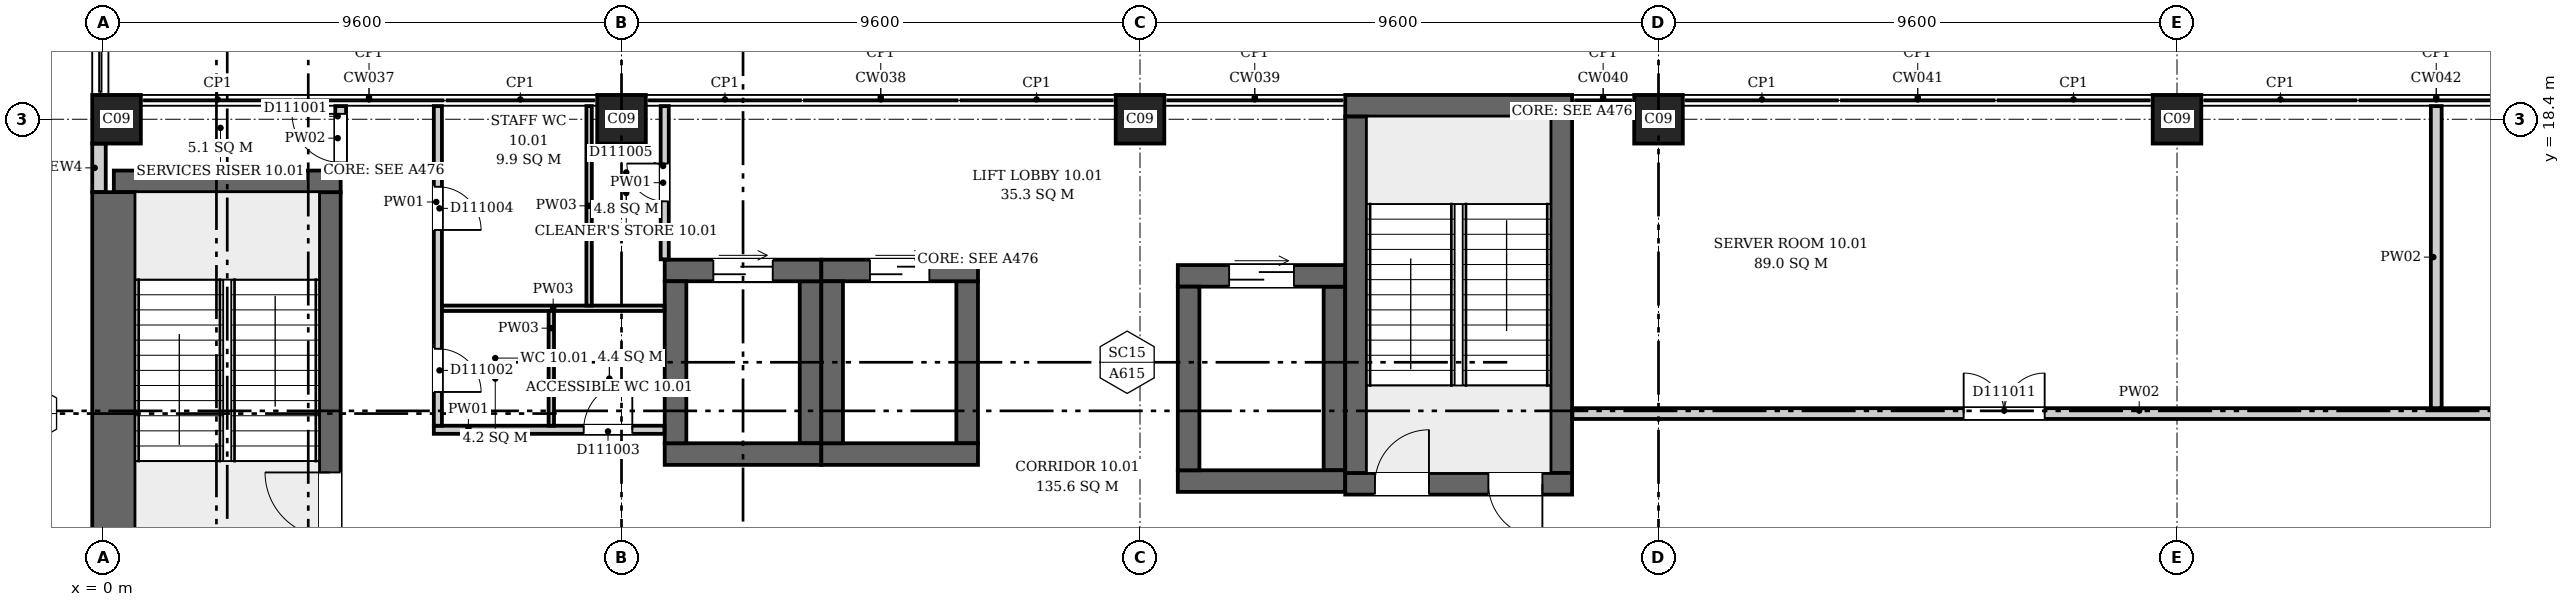
"""IFC4 building model, lengths in metres.
Left out: names, types, materials, properties, quantities, classifications, styles, units other than length and angle.
Written with IfcOpenShell. Run it as: python <this file> out.ifc"""

import sys

from ifc_helpers import new_model, si_unit, direction, frame, frame_2d, origin, origin_2d, place, context, subcontext, project, spatial, rectangle, extrude, element, fill, save


model = new_model("IFC4")
c1 = context("Model", 3, precision=1e-05, world=origin(), true_north=direction((0.0, 1.0)))
c2 = subcontext(c1, "Body", "Model", "MODEL_VIEW")
j1 = project(units=[si_unit("LENGTHUNIT", "METRE"), si_unit("PLANEANGLEUNIT", "RADIAN")], contexts=[c1])
p1 = place(None, origin())
s1 = spatial("IfcSite", under=j1, at=p1, CompositionType="ELEMENT")
p2 = place(p1, origin())
s2 = spatial("IfcBuilding", under=s1, at=p2, CompositionType="ELEMENT")
p3 = place(p2, frame((0.0, 0.0, 52.9)))
s3 = spatial("IfcBuildingStorey", under=s2, at=p3, CompositionType="ELEMENT", Elevation=52.9)
p4 = place(p3, frame((0.2, 17.25, 0.0), z_axis=(0.0, 0.0, 1.0), x_axis=(1.0, 0.0, 0.0)))
e1 = element("IfcWall", 1, at=p4, inside=s3, PredefinedType="SHEAR", context=c2, shape_type="SweptSolid", body=[
    extrude(rectangle(XDim=4.2, YDim=0.4, at=frame_2d((2.1, 0.0))), origin(), (0.0, 0.0, 1.0), 4.2),
])
p5 = place(p3, frame((0.2, 10.45, 0.0), z_axis=(0.0, 0.0, 1.0), x_axis=(0.0, 1.0, 0.0)))
e2 = element("IfcWall", 2, at=p5, inside=s3, PredefinedType="SHEAR", context=c2, shape_type="SweptSolid", body=[
    extrude(rectangle(XDim=6.6, YDim=0.8, at=frame_2d((3.3, 0.0))), origin(), (0.0, 0.0, 1.0), 4.2),
])
p6 = place(p3, frame((4.2, 10.45, 0.0), z_axis=(0.0, 0.0, 1.0), x_axis=(0.0, 1.0, 0.0)))
e3 = element("IfcWall", 3, at=p6, inside=s3, PredefinedType="SHEAR", context=c2, shape_type="SweptSolid", body=[
    extrude(rectangle(XDim=6.6, YDim=0.4, at=frame_2d((3.3, 0.0))), origin(), (0.0, 0.0, 1.0), 4.2),
])
p7 = place(p6, frame((0.21, 0.0, 0.0)))
e4 = element("IfcOpeningElement", 4, at=p7, cuts=e3, PredefinedType="OPENING", context=c2, shape_type="SweptSolid", body=[
    extrude(rectangle(XDim=1.2, YDim=2.1, at=frame_2d((0.6, 1.05))), frame((0.0, 0.21, 0.0), z_axis=(0.0, -1.0, 0.0), x_axis=(1.0, 0.0, 0.0)), (0.0, 0.0, 1.0), 0.42),
])
p8 = place(p3, frame((23.0, 11.65, 0.0), z_axis=(0.0, 0.0, 1.0), x_axis=(1.0, 0.0, 0.0)))
e5 = element("IfcWall", 5, at=p8, inside=s3, PredefinedType="SHEAR", context=c2, shape_type="SweptSolid", body=[
    extrude(rectangle(XDim=4.2, YDim=0.4, at=frame_2d((2.1, 0.0))), origin(), (0.0, 0.0, 1.0), 4.2),
])
p9 = place(p8, frame((0.55, 0.0, 0.0)))
e6 = element("IfcOpeningElement", 6, at=p9, cuts=e5, PredefinedType="OPENING", context=c2, shape_type="SweptSolid", body=[
    extrude(rectangle(XDim=1.0, YDim=2.1, at=frame_2d((0.5, 1.05))), frame((0.0, 0.21, 0.0), z_axis=(0.0, -1.0, 0.0), x_axis=(1.0, 0.0, 0.0)), (0.0, 0.0, 1.0), 0.42),
])
p10 = place(p8, frame((2.65, 0.0, 0.0)))
e7 = element("IfcOpeningElement", 7, at=p10, cuts=e5, PredefinedType="OPENING", context=c2, shape_type="SweptSolid", body=[
    extrude(rectangle(XDim=1.0, YDim=2.1, at=frame_2d((0.5, 1.05))), frame((0.0, 0.21, 0.0), z_axis=(0.0, -1.0, 0.0), x_axis=(1.0, 0.0, 0.0)), (0.0, 0.0, 1.0), 0.42),
])
p11 = place(p3, frame((23.0, 18.65, 0.0), z_axis=(0.0, 0.0, 1.0), x_axis=(1.0, 0.0, 0.0)))
e8 = element("IfcWall", 8, at=p11, inside=s3, PredefinedType="SHEAR", context=c2, shape_type="SweptSolid", body=[
    extrude(rectangle(XDim=4.2, YDim=0.4, at=frame_2d((2.1, 0.0))), origin(), (0.0, 0.0, 1.0), 4.2),
])
for number, where, z_axis, x_axis in (
    (9, (23.2, 11.85, 0.0), (0.0, 0.0, 1.0), (0.0, 1.0, 0.0)),
    (10, (27.0, 11.85, 0.0), (0.0, 0.0, 1.0), (0.0, 1.0, 0.0)),
):
    element("IfcWall", number, at=place(p3, frame(where, z_axis=z_axis, x_axis=x_axis)), inside=s3, PredefinedType="SHEAR", context=c2, shape_type="SweptSolid", body=[
        extrude(rectangle(XDim=6.6, YDim=0.4, at=frame_2d((3.3, 0.0))), origin(), (0.0, 0.0, 1.0), 4.2),
    ])
p12 = place(p3, frame((10.4, 12.2, 0.0), z_axis=(0.0, 0.0, 1.0), x_axis=(1.0, 0.0, 0.0)))
e11 = element("IfcWall", 11, at=p12, inside=s3, PredefinedType="SHEAR", context=c2, shape_type="SweptSolid", body=[
    extrude(rectangle(XDim=2.9, YDim=0.4, at=frame_2d((1.45, 0.0))), origin(), (0.0, 0.0, 1.0), 4.2),
])
p13 = place(p3, frame((10.4, 15.6, 0.0), z_axis=(0.0, 0.0, 1.0), x_axis=(1.0, 0.0, 0.0)))
e12 = element("IfcWall", 12, at=p13, inside=s3, PredefinedType="SHEAR", context=c2, shape_type="SweptSolid", body=[
    extrude(rectangle(XDim=2.9, YDim=0.4, at=frame_2d((1.45, 0.0))), origin(), (0.0, 0.0, 1.0), 4.2),
])
p14 = place(p13, frame((0.9, 0.0, 0.0)))
e13 = element("IfcOpeningElement", 13, at=p14, cuts=e12, PredefinedType="OPENING", context=c2, shape_type="SweptSolid", body=[
    extrude(rectangle(XDim=1.1, YDim=2.1, at=frame_2d((0.55, 1.05))), frame((0.0, 0.21, 0.0), z_axis=(0.0, -1.0, 0.0), x_axis=(1.0, 0.0, 0.0)), (0.0, 0.0, 1.0), 0.42),
])
for number, where, z_axis, x_axis in (
    (14, (10.6, 12.4, 0.0), (0.0, 0.0, 1.0), (0.0, 1.0, 0.0)),
    (15, (13.1, 12.4, 0.0), (0.0, 0.0, 1.0), (0.0, 1.0, 0.0)),
):
    element("IfcWall", number, at=place(p3, frame(where, z_axis=z_axis, x_axis=x_axis)), inside=s3, PredefinedType="SHEAR", context=c2, shape_type="SweptSolid", body=[
        extrude(rectangle(XDim=3.0, YDim=0.4, at=frame_2d((1.5, 0.0))), origin(), (0.0, 0.0, 1.0), 4.2),
    ])
p15 = place(p3, frame((13.3, 12.2, 0.0), z_axis=(0.0, 0.0, 1.0), x_axis=(1.0, 0.0, 0.0)))
e16 = element("IfcWall", 16, at=p15, inside=s3, PredefinedType="SHEAR", context=c2, shape_type="SweptSolid", body=[
    extrude(rectangle(XDim=2.9, YDim=0.4, at=frame_2d((1.45, 0.0))), origin(), (0.0, 0.0, 1.0), 4.2),
])
p16 = place(p3, frame((13.3, 15.6, 0.0), z_axis=(0.0, 0.0, 1.0), x_axis=(1.0, 0.0, 0.0)))
e17 = element("IfcWall", 17, at=p16, inside=s3, PredefinedType="SHEAR", context=c2, shape_type="SweptSolid", body=[
    extrude(rectangle(XDim=2.9, YDim=0.4, at=frame_2d((1.45, 0.0))), origin(), (0.0, 0.0, 1.0), 4.2),
])
p17 = place(p16, frame((0.9, 0.0, 0.0)))
e18 = element("IfcOpeningElement", 18, at=p17, cuts=e17, PredefinedType="OPENING", context=c2, shape_type="SweptSolid", body=[
    extrude(rectangle(XDim=1.1, YDim=2.1, at=frame_2d((0.55, 1.05))), frame((0.0, 0.21, 0.0), z_axis=(0.0, -1.0, 0.0), x_axis=(1.0, 0.0, 0.0)), (0.0, 0.0, 1.0), 0.42),
])
for number, where, z_axis, x_axis in (
    (19, (13.5, 12.4, 0.0), (0.0, 0.0, 1.0), (0.0, 1.0, 0.0)),
    (20, (16.0, 12.4, 0.0), (0.0, 0.0, 1.0), (0.0, 1.0, 0.0)),
):
    element("IfcWall", number, at=place(p3, frame(where, z_axis=z_axis, x_axis=x_axis)), inside=s3, PredefinedType="SHEAR", context=c2, shape_type="SweptSolid", body=[
        extrude(rectangle(XDim=3.0, YDim=0.4, at=frame_2d((1.5, 0.0))), origin(), (0.0, 0.0, 1.0), 4.2),
    ])
p18 = place(p3, frame((19.9, 11.7, 0.0), z_axis=(0.0, 0.0, 1.0), x_axis=(1.0, 0.0, 0.0)))
e21 = element("IfcWall", 21, at=p18, inside=s3, PredefinedType="SHEAR", context=c2, shape_type="SweptSolid", body=[
    extrude(rectangle(XDim=3.1, YDim=0.4, at=frame_2d((1.55, 0.0))), origin(), (0.0, 0.0, 1.0), 4.2),
])
p19 = place(p3, frame((19.9, 15.5, 0.0), z_axis=(0.0, 0.0, 1.0), x_axis=(1.0, 0.0, 0.0)))
e22 = element("IfcWall", 22, at=p19, inside=s3, PredefinedType="SHEAR", context=c2, shape_type="SweptSolid", body=[
    extrude(rectangle(XDim=3.1, YDim=0.4, at=frame_2d((1.55, 0.0))), origin(), (0.0, 0.0, 1.0), 4.2),
])
p20 = place(p19, frame((0.95, 0.0, 0.0)))
e23 = element("IfcOpeningElement", 23, at=p20, cuts=e22, PredefinedType="OPENING", context=c2, shape_type="SweptSolid", body=[
    extrude(rectangle(XDim=1.2, YDim=2.1, at=frame_2d((0.6, 1.05))), frame((0.0, 0.21, 0.0), z_axis=(0.0, -1.0, 0.0), x_axis=(1.0, 0.0, 0.0)), (0.0, 0.0, 1.0), 0.42),
])
for number, where, z_axis, x_axis in (
    (24, (20.1, 11.9, 0.0), (0.0, 0.0, 1.0), (0.0, 1.0, 0.0)),
    (25, (22.8, 11.9, 0.0), (0.0, 0.0, 1.0), (0.0, 1.0, 0.0)),
):
    element("IfcWall", number, at=place(p3, frame(where, z_axis=z_axis, x_axis=x_axis)), inside=s3, PredefinedType="SHEAR", context=c2, shape_type="SweptSolid", body=[
        extrude(rectangle(XDim=3.4, YDim=0.4, at=frame_2d((1.7, 0.0))), origin(), (0.0, 0.0, 1.0), 4.2),
    ])
for number, where, z_axis, x_axis in (
    (26, (0.25, 18.4, 0.0), (0.0, 0.0, 1.0), (1.0, 0.0, 0.0)),
    (27, (9.6, 18.4, 0.0), (0.0, 0.0, 1.0), (1.0, 0.0, 0.0)),
    (28, (19.2, 18.4, 0.0), (0.0, 0.0, 1.0), (1.0, 0.0, 0.0)),
    (29, (28.8, 18.4, 0.0), (0.0, 0.0, 1.0), (1.0, 0.0, 0.0)),
    (30, (38.4, 18.4, 0.0), (0.0, 0.0, 1.0), (1.0, 0.0, 0.0)),
):
    element("IfcColumn", number, at=place(p3, frame(where, z_axis=z_axis, x_axis=x_axis)), inside=s3, PredefinedType="COLUMN", context=c2, shape_type="SweptSolid", body=[
        extrude(rectangle(XDim=0.9, YDim=0.9, at=origin_2d()), origin(), (0.0, 0.0, 1.0), 4.2),
    ])
p21 = place(p3, frame((-0.074, 17.95, 0.0), z_axis=(0.0, 0.0, 1.0), x_axis=(0.0, -1.0, 0.0)))
e31 = element("IfcWall", 31, at=p21, inside=s3, PredefinedType="ELEMENTEDWALL", context=c2, shape_type="SweptSolid", body=[
    extrude(rectangle(XDim=0.9, YDim=0.25, at=frame_2d((0.45, 0.0))), origin(), (0.0, 0.0, 1.0), 3.9),
])
p22 = place(p3, frame((4.4, 17.456, 0.0), z_axis=(0.0, 0.0, 1.0), x_axis=(0.0, 1.0, 0.0)))
e32 = element("IfcWall", 32, at=p22, inside=s3, PredefinedType="PARTITIONING", context=c2, shape_type="SweptSolid", body=[
    extrude(rectangle(XDim=1.188, YDim=0.2, at=frame_2d((0.594, 0.0))), origin(), (0.0, 0.0, 1.0), 3.9),
])
p23 = place(p22, frame((0.144, 0.0, 0.0)))
e33 = element("IfcOpeningElement", 33, at=p23, cuts=e32, PredefinedType="OPENING", context=c2, shape_type="SweptSolid", body=[
    extrude(rectangle(XDim=0.9, YDim=2.1, at=frame_2d((0.45, 1.05))), frame((0.0, 0.11, 0.0), z_axis=(0.0, -1.0, 0.0), x_axis=(1.0, 0.0, 0.0)), (0.0, 0.0, 1.0), 0.22),
])
p24 = place(p3, frame((6.125, 12.65, 0.0), z_axis=(0.0, 0.0, 1.0), x_axis=(1.0, 0.0, 0.0)))
e34 = element("IfcWall", 34, at=p24, inside=s3, PredefinedType="PARTITIONING", context=c2, shape_type="SweptSolid", body=[
    extrude(rectangle(XDim=4.269, YDim=0.15, at=frame_2d((2.135, 0.0))), origin(), (0.0, 0.0, 1.0), 3.9),
])
p25 = place(p24, frame((2.775, 0.0, 0.0)))
e35 = element("IfcOpeningElement", 35, at=p25, cuts=e34, PredefinedType="OPENING", context=c2, shape_type="SweptSolid", body=[
    extrude(rectangle(XDim=0.9, YDim=2.1, at=frame_2d((0.45, 1.05))), frame((0.0, 0.085, 0.0), z_axis=(0.0, -1.0, 0.0), x_axis=(1.0, 0.0, 0.0)), (0.0, 0.0, 1.0), 0.17),
])
p26 = place(p3, frame((6.2, 12.725, 0.0), z_axis=(0.0, 0.0, 1.0), x_axis=(0.0, 1.0, 0.0)))
e36 = element("IfcWall", 36, at=p26, inside=s3, PredefinedType="PARTITIONING", context=c2, shape_type="SweptSolid", body=[
    extrude(rectangle(XDim=5.919, YDim=0.15, at=frame_2d((2.959, 0.0))), origin(), (0.0, 0.0, 1.0), 3.9),
])
p27 = place(p26, frame((0.625, 0.0, 0.0)))
e37 = element("IfcOpeningElement", 37, at=p27, cuts=e36, PredefinedType="OPENING", context=c2, shape_type="SweptSolid", body=[
    extrude(rectangle(XDim=0.8, YDim=2.1, at=frame_2d((0.4, 1.05))), frame((0.0, 0.085, 0.0), z_axis=(0.0, -1.0, 0.0), x_axis=(1.0, 0.0, 0.0)), (0.0, 0.0, 1.0), 0.17),
])
p28 = place(p26, frame((3.625, 0.0, 0.0)))
e38 = element("IfcOpeningElement", 38, at=p28, cuts=e36, PredefinedType="OPENING", context=c2, shape_type="SweptSolid", body=[
    extrude(rectangle(XDim=0.8, YDim=2.1, at=frame_2d((0.4, 1.05))), frame((0.0, 0.085, 0.0), z_axis=(0.0, -1.0, 0.0), x_axis=(1.0, 0.0, 0.0)), (0.0, 0.0, 1.0), 0.17),
])
p29 = place(p3, frame((6.275, 14.9, 0.0), z_axis=(0.0, 0.0, 1.0), x_axis=(1.0, 0.0, 0.0)))
e39 = element("IfcWall", 39, at=p29, inside=s3, PredefinedType="PARTITIONING", context=c2, shape_type="SweptSolid", body=[
    extrude(rectangle(XDim=4.119, YDim=0.1, at=frame_2d((2.06, 0.0))), origin(), (0.0, 0.0, 1.0), 3.9),
])
p30 = place(p3, frame((8.3, 12.725, 0.0), z_axis=(0.0, 0.0, 1.0), x_axis=(0.0, 1.0, 0.0)))
e40 = element("IfcWall", 40, at=p30, inside=s3, PredefinedType="PARTITIONING", context=c2, shape_type="SweptSolid", body=[
    extrude(rectangle(XDim=2.125, YDim=0.1, at=frame_2d((1.062, 0.0))), origin(), (0.0, 0.0, 1.0), 3.9),
])
p31 = place(p3, frame((9.0, 14.95, 0.0), z_axis=(0.0, 0.0, 1.0), x_axis=(0.0, 1.0, 0.0)))
e41 = element("IfcWall", 41, at=p31, inside=s3, PredefinedType="PARTITIONING", context=c2, shape_type="SweptSolid", body=[
    extrude(rectangle(XDim=3.694, YDim=0.1, at=frame_2d((1.847, 0.0))), origin(), (0.0, 0.0, 1.0), 3.9),
])
p32 = place(p3, frame((10.4, 15.806, 0.0), z_axis=(0.0, 0.0, 1.0), x_axis=(0.0, 1.0, 0.0)))
e42 = element("IfcWall", 42, at=p32, inside=s3, PredefinedType="PARTITIONING", context=c2, shape_type="SweptSolid", body=[
    extrude(rectangle(XDim=2.838, YDim=0.15, at=frame_2d((1.419, 0.0))), origin(), (0.0, 0.0, 1.0), 3.9),
])
p33 = place(p32, frame((1.074, 0.0, 0.0)))
e43 = element("IfcOpeningElement", 43, at=p33, cuts=e42, PredefinedType="OPENING", context=c2, shape_type="SweptSolid", body=[
    extrude(rectangle(XDim=0.7, YDim=2.1, at=frame_2d((0.35, 1.05))), frame((0.0, 0.085, 0.0), z_axis=(0.0, -1.0, 0.0), x_axis=(1.0, 0.0, 0.0)), (0.0, 0.0, 1.0), 0.17),
])
p34 = place(p3, frame((27.206, 12.95, 0.0), z_axis=(0.0, 0.0, 1.0), x_axis=(1.0, 0.0, 0.0)))
e44 = element("IfcWall", 44, at=p34, inside=s3, PredefinedType="PARTITIONING", context=c2, shape_type="SweptSolid", body=[
    extrude(rectangle(XDim=20.988, YDim=0.2, at=frame_2d((10.494, 0.0))), origin(), (0.0, 0.0, 1.0), 3.9),
])
p35 = place(p34, frame((7.244, 0.0, 0.0)))
e45 = element("IfcOpeningElement", 45, at=p35, cuts=e44, PredefinedType="OPENING", context=c2, shape_type="SweptSolid", body=[
    extrude(rectangle(XDim=1.5, YDim=2.1, at=frame_2d((0.75, 1.05))), frame((0.0, 0.11, 0.0), z_axis=(0.0, -1.0, 0.0), x_axis=(1.0, 0.0, 0.0)), (0.0, 0.0, 1.0), 0.22),
])
p36 = place(p34, frame((18.044, 0.0, 0.0)))
e46 = element("IfcOpeningElement", 46, at=p36, cuts=e44, PredefinedType="OPENING", context=c2, shape_type="SweptSolid", body=[
    extrude(rectangle(XDim=0.9, YDim=2.1, at=frame_2d((0.45, 1.05))), frame((0.0, 0.11, 0.0), z_axis=(0.0, -1.0, 0.0), x_axis=(1.0, 0.0, 0.0)), (0.0, 0.0, 1.0), 0.22),
])
p37 = place(p3, frame((43.2, 13.05, 0.0), z_axis=(0.0, 0.0, 1.0), x_axis=(0.0, 1.0, 0.0)))
e47 = element("IfcWall", 47, at=p37, inside=s3, PredefinedType="PARTITIONING", context=c2, shape_type="SweptSolid", body=[
    extrude(rectangle(XDim=5.594, YDim=0.2, at=frame_2d((2.797, 0.0))), origin(), (0.0, 0.0, 1.0), 3.9),
])
p38 = place(p7, origin())
e48 = element("IfcDoor", 48, at=p38, inside=s3, OperationType="SINGLE_SWING_RIGHT", PredefinedType="DOOR", context=c2, shape_type="SweptSolid", body=[
    extrude(rectangle(XDim=1.2, YDim=2.1, at=frame_2d((0.6, 1.05))), frame((0.0, 0.025, 0.0), z_axis=(0.0, -1.0, 0.0), x_axis=(1.0, 0.0, 0.0)), (0.0, 0.0, 1.0), 0.05),
])
fill(e4, e48)
p39 = place(p9, origin())
e49 = element("IfcDoor", 49, at=p39, inside=s3, OperationType="SINGLE_SWING_RIGHT", PredefinedType="DOOR", context=c2, shape_type="SweptSolid", body=[
    extrude(rectangle(XDim=1.0, YDim=2.1, at=frame_2d((0.5, 1.05))), frame((0.0, 0.025, 0.0), z_axis=(0.0, -1.0, 0.0), x_axis=(1.0, 0.0, 0.0)), (0.0, 0.0, 1.0), 0.05),
])
fill(e6, e49)
p40 = place(p10, origin())
e50 = element("IfcDoor", 50, at=p40, inside=s3, OperationType="SINGLE_SWING_LEFT", PredefinedType="DOOR", context=c2, shape_type="SweptSolid", body=[
    extrude(rectangle(XDim=1.0, YDim=2.1, at=frame_2d((0.5, 1.05))), frame((0.0, 0.025, 0.0), z_axis=(0.0, -1.0, 0.0), x_axis=(1.0, 0.0, 0.0)), (0.0, 0.0, 1.0), 0.05),
])
fill(e7, e50)
p41 = place(p14, origin())
e51 = element("IfcDoor", 51, at=p41, inside=s3, OperationType="DOUBLE_DOOR_SLIDING", PredefinedType="DOOR", context=c2, shape_type="SweptSolid", body=[
    extrude(rectangle(XDim=1.1, YDim=2.1, at=frame_2d((0.55, 1.05))), frame((0.0, 0.025, 0.0), z_axis=(0.0, -1.0, 0.0), x_axis=(1.0, 0.0, 0.0)), (0.0, 0.0, 1.0), 0.05),
])
fill(e13, e51)
p42 = place(p17, origin())
e52 = element("IfcDoor", 52, at=p42, inside=s3, OperationType="DOUBLE_DOOR_SLIDING", PredefinedType="DOOR", context=c2, shape_type="SweptSolid", body=[
    extrude(rectangle(XDim=1.1, YDim=2.1, at=frame_2d((0.55, 1.05))), frame((0.0, 0.025, 0.0), z_axis=(0.0, -1.0, 0.0), x_axis=(1.0, 0.0, 0.0)), (0.0, 0.0, 1.0), 0.05),
])
fill(e18, e52)
p43 = place(p20, origin())
e53 = element("IfcDoor", 53, at=p43, inside=s3, OperationType="DOUBLE_DOOR_SLIDING", PredefinedType="DOOR", context=c2, shape_type="SweptSolid", body=[
    extrude(rectangle(XDim=1.2, YDim=2.1, at=frame_2d((0.6, 1.05))), frame((0.0, 0.025, 0.0), z_axis=(0.0, -1.0, 0.0), x_axis=(1.0, 0.0, 0.0)), (0.0, 0.0, 1.0), 0.05),
])
fill(e23, e53)
p44 = place(p23, origin())
e54 = element("IfcDoor", 54, at=p44, inside=s3, OperationType="SINGLE_SWING_LEFT", PredefinedType="DOOR", context=c2, shape_type="SweptSolid", body=[
    extrude(rectangle(XDim=0.9, YDim=2.1, at=frame_2d((0.45, 1.05))), frame((0.0, 0.025, 0.0), z_axis=(0.0, -1.0, 0.0), x_axis=(1.0, 0.0, 0.0)), (0.0, 0.0, 1.0), 0.05),
])
fill(e33, e54)
p45 = place(p27, origin())
e55 = element("IfcDoor", 55, at=p45, inside=s3, OperationType="SINGLE_SWING_LEFT", PredefinedType="DOOR", context=c2, shape_type="SweptSolid", body=[
    extrude(rectangle(XDim=0.8, YDim=2.1, at=frame_2d((0.4, 1.05))), frame((0.0, 0.025, 0.0), z_axis=(0.0, -1.0, 0.0), x_axis=(1.0, 0.0, 0.0)), (0.0, 0.0, 1.0), 0.05),
])
fill(e37, e55)
p46 = place(p25, origin())
e56 = element("IfcDoor", 56, at=p46, inside=s3, OperationType="SINGLE_SWING_RIGHT", PredefinedType="DOOR", context=c2, shape_type="SweptSolid", body=[
    extrude(rectangle(XDim=0.9, YDim=2.1, at=frame_2d((0.45, 1.05))), frame((0.0, 0.025, 0.0), z_axis=(0.0, -1.0, 0.0), x_axis=(1.0, 0.0, 0.0)), (0.0, 0.0, 1.0), 0.05),
])
fill(e35, e56)
p47 = place(p28, origin())
e57 = element("IfcDoor", 57, at=p47, inside=s3, OperationType="SINGLE_SWING_LEFT", PredefinedType="DOOR", context=c2, shape_type="SweptSolid", body=[
    extrude(rectangle(XDim=0.8, YDim=2.1, at=frame_2d((0.4, 1.05))), frame((0.0, 0.025, 0.0), z_axis=(0.0, -1.0, 0.0), x_axis=(1.0, 0.0, 0.0)), (0.0, 0.0, 1.0), 0.05),
])
fill(e38, e57)
p48 = place(p33, origin())
e58 = element("IfcDoor", 58, at=p48, inside=s3, OperationType="SINGLE_SWING_LEFT", PredefinedType="DOOR", context=c2, shape_type="SweptSolid", body=[
    extrude(rectangle(XDim=0.7, YDim=2.1, at=frame_2d((0.35, 1.05))), frame((0.0, 0.025, 0.0), z_axis=(0.0, -1.0, 0.0), x_axis=(1.0, 0.0, 0.0)), (0.0, 0.0, 1.0), 0.05),
])
fill(e43, e58)
p49 = place(p35, origin())
e59 = element("IfcDoor", 59, at=p49, inside=s3, OperationType="DOUBLE_DOOR_SINGLE_SWING", PredefinedType="DOOR", context=c2, shape_type="SweptSolid", body=[
    extrude(rectangle(XDim=1.5, YDim=2.1, at=frame_2d((0.75, 1.05))), frame((0.0, 0.025, 0.0), z_axis=(0.0, -1.0, 0.0), x_axis=(1.0, 0.0, 0.0)), (0.0, 0.0, 1.0), 0.05),
])
fill(e45, e59)
save(model, sys.argv[1])
